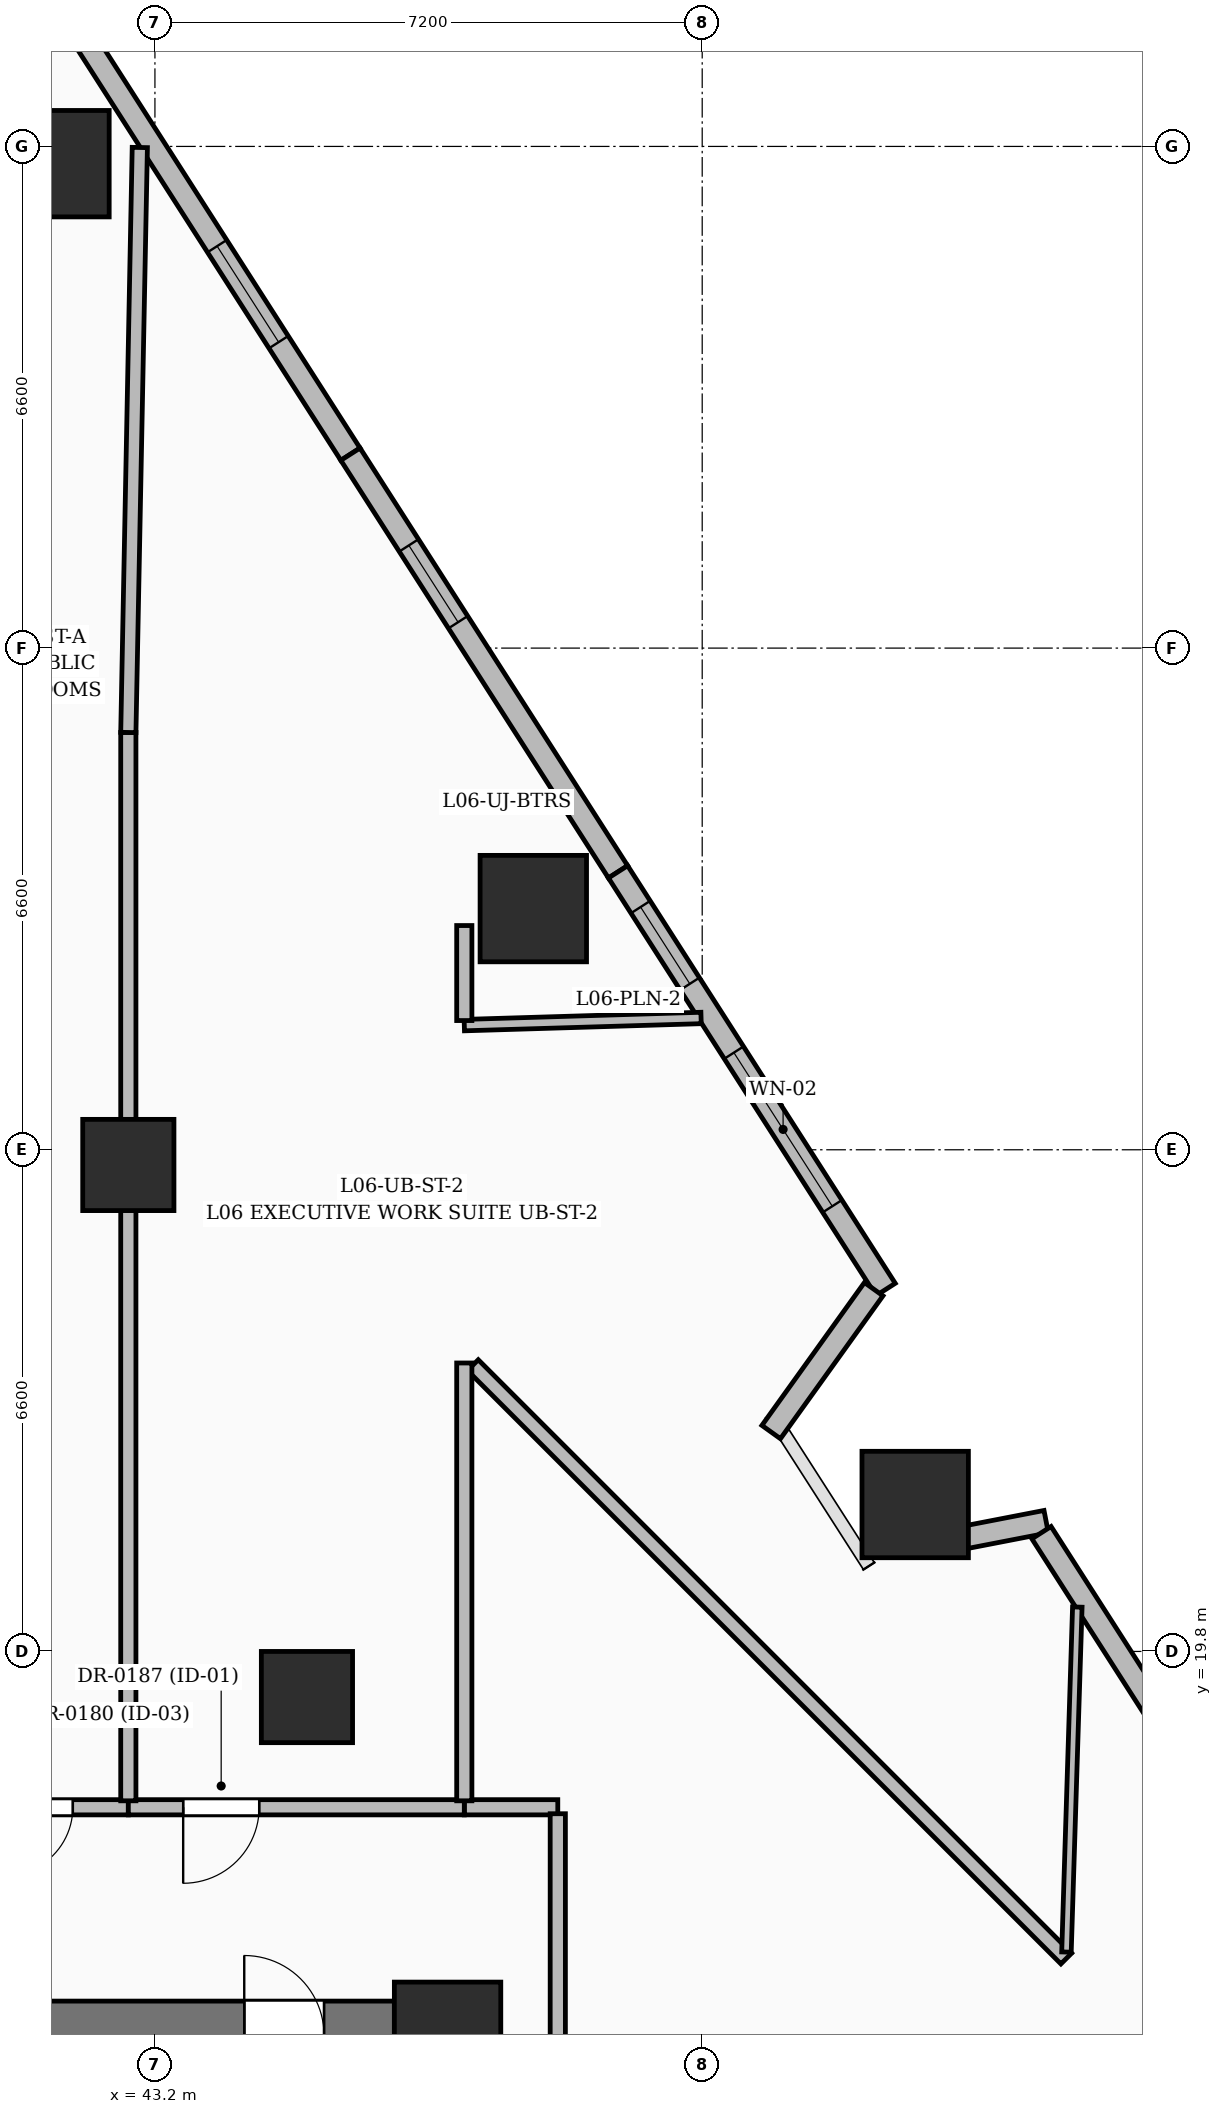
"""IFC4 building model, lengths in metres.
Left out: names, types, materials, properties, quantities, classifications, styles, units other than length and angle.
Written with IfcOpenShell. Run it as: python <this file> out.ifc"""

import sys

from ifc_helpers import new_model, si_unit, direction, frame, frame_2d, origin, origin_2d, place, context, subcontext, project, spatial, rectangle, extrude, element, fill, save


model = new_model("IFC4")
c1 = context("Model", 3, precision=1e-05, world=origin(), true_north=direction((0.0, 1.0)))
c2 = subcontext(c1, "Body", "Model", "MODEL_VIEW")
j1 = project(units=[si_unit("LENGTHUNIT", "METRE"), si_unit("PLANEANGLEUNIT", "RADIAN")], contexts=[c1])
p1 = place(None, origin())
s1 = spatial("IfcSite", under=j1, at=p1, CompositionType="ELEMENT")
p2 = place(p1, origin())
s2 = spatial("IfcBuilding", under=s1, at=p2, CompositionType="ELEMENT")
p3 = place(p2, frame((0.0, 0.0, 31.8)))
s3 = spatial("IfcBuildingStorey", under=s2, at=p3, CompositionType="ELEMENT", Elevation=31.8)
p4 = place(p3, frame((47.05, 14.75, 0.0), z_axis=(0.0, 0.0, 1.0), x_axis=(1.0, 0.0, 0.0)))
e1 = element("IfcColumn", 1, at=p4, inside=s3, PredefinedType="COLUMN", context=c2, shape_type="SweptSolid", body=[
    extrude(rectangle(XDim=1.4, YDim=1.4, at=origin_2d()), origin(), (0.0, 0.0, 1.0), 3.6),
])
for number, where, z_axis, x_axis in (
    (2, (45.2, 19.2, 0.0), (0.0, 0.0, 1.0), (1.0, 0.0, 0.0)),
    (3, (42.85, 26.2, 0.0), (0.0, 0.0, 1.0), (1.0, 0.0, 0.0)),
):
    element("IfcColumn", number, at=place(p3, frame(where, z_axis=z_axis, x_axis=x_axis)), inside=s3, PredefinedType="COLUMN", context=c2, shape_type="SweptSolid", body=[
        extrude(rectangle(XDim=1.2, YDim=1.2, at=origin_2d()), origin(), (0.0, 0.0, 1.0), 3.6),
    ])
p5 = place(p3, frame((35.85, 14.75, 0.0), z_axis=(0.0, 0.0, 1.0), x_axis=(1.0, 0.0, 0.0)))
e4 = element("IfcWall", 4, at=p5, inside=s3, PredefinedType="SHEAR", context=c2, shape_type="SweptSolid", body=[
    extrude(rectangle(XDim=10.5, YDim=0.9, at=frame_2d((5.25, 0.0))), origin(), (0.0, 0.0, 1.0), 3.6),
])
p6 = place(p5, frame((0.925, 0.0, 0.0)))
e5 = element("IfcOpeningElement", 5, at=p6, cuts=e4, PredefinedType="OPENING", context=c2, shape_type="SweptSolid", body=[
    extrude(rectangle(XDim=1.05, YDim=2.15, at=frame_2d((0.525, 1.075))), frame((0.0, 0.46, 0.0), z_axis=(0.0, -1.0, 0.0), x_axis=(1.0, 0.0, 0.0)), (0.0, 0.0, 1.0), 0.92),
])
p7 = place(p5, frame((8.525, 0.0, 0.0)))
e6 = element("IfcOpeningElement", 6, at=p7, cuts=e4, PredefinedType="OPENING", context=c2, shape_type="SweptSolid", body=[
    extrude(rectangle(XDim=1.05, YDim=2.15, at=frame_2d((0.525, 1.075))), frame((0.0, 0.46, 0.0), z_axis=(0.0, -1.0, 0.0), x_axis=(1.0, 0.0, 0.0)), (0.0, 0.0, 1.0), 0.92),
])
for number, where, z_axis, x_axis in (
    (7, (53.202, 21.733, 0.0), (0.0, 0.0, 1.0), (1.0, 0.0, 0.0)),
    (8, (48.178, 29.573, 0.0), (0.0, 0.0, 1.0), (1.0, 0.0, 0.0)),
    (9, (41.898, 39.373, 0.0), (0.0, 0.0, 1.0), (1.0, 0.0, 0.0)),
):
    element("IfcColumn", number, at=place(p3, frame(where, z_axis=z_axis, x_axis=x_axis)), inside=s3, PredefinedType="COLUMN", context=c2, shape_type="SweptSolid", body=[
        extrude(rectangle(XDim=1.4, YDim=1.4, at=origin_2d()), origin(), (0.0, 0.0, 1.0), 3.6),
    ])
p8 = place(p3, frame((42.251, 41.045, 0.0), z_axis=(0.0, 0.0, 1.0), x_axis=(0.539526045631, -0.841968910403, 0.0)))
e10 = element("IfcWall", 10, at=p8, inside=s3, PredefinedType="SOLIDWALL", context=c2, shape_type="SweptSolid", body=[
    extrude(rectangle(XDim=6.526, YDim=0.3, at=frame_2d((3.263, 0.0))), origin(), (0.0, 0.0, 1.0), 3.35),
])
p9 = place(p8, frame((3.275, 0.0, 0.6)))
e11 = element("IfcOpeningElement", 11, at=p9, cuts=e10, PredefinedType="OPENING", context=c2, shape_type="SweptSolid", body=[
    extrude(rectangle(XDim=1.5, YDim=2.1, at=frame_2d((0.75, 1.05))), frame((0.0, 0.16, 0.0), z_axis=(0.0, -1.0, 0.0), x_axis=(1.0, 0.0, 0.0)), (0.0, 0.0, 1.0), 0.32),
])
p10 = place(p3, frame((45.772, 35.551, 0.0), z_axis=(0.0, 0.0, 1.0), x_axis=(0.539526045631, -0.841968910403, 0.0)))
e12 = element("IfcWall", 12, at=p10, inside=s3, PredefinedType="SOLIDWALL", context=c2, shape_type="SweptSolid", body=[
    extrude(rectangle(XDim=6.526, YDim=0.3, at=frame_2d((3.263, 0.0))), origin(), (0.0, 0.0, 1.0), 3.35),
])
p11 = place(p10, frame((1.425, 0.0, 0.8)))
e13 = element("IfcOpeningElement", 13, at=p11, cuts=e12, PredefinedType="OPENING", context=c2, shape_type="SweptSolid", body=[
    extrude(rectangle(XDim=1.2, YDim=1.8, at=frame_2d((0.6, 0.9))), frame((0.0, 0.16, 0.0), z_axis=(0.0, -1.0, 0.0), x_axis=(1.0, 0.0, 0.0)), (0.0, 0.0, 1.0), 0.32),
])
p12 = place(p3, frame((49.293, 30.057, 0.0), z_axis=(0.0, 0.0, 1.0), x_axis=(0.539509050887, -0.84197980024, 0.0)))
e14 = element("IfcWall", 14, at=p12, inside=s3, PredefinedType="SOLIDWALL", context=c2, shape_type="SweptSolid", body=[
    extrude(rectangle(XDim=6.526, YDim=0.3, at=frame_2d((3.263, 0.0))), origin(), (0.0, 0.0, 1.0), 3.35),
])
p13 = place(p12, frame((2.825, 0.0, 0.6)))
e15 = element("IfcOpeningElement", 15, at=p13, cuts=e14, PredefinedType="OPENING", context=c2, shape_type="SweptSolid", body=[
    extrude(rectangle(XDim=2.4, YDim=2.1, at=frame_2d((1.2, 1.05))), frame((0.0, 0.16, 0.0), z_axis=(0.0, -1.0, 0.0), x_axis=(1.0, 0.0, 0.0)), (0.0, 0.0, 1.0), 0.32),
])
p14 = place(p12, frame((0.55, 0.0, 0.8)))
e16 = element("IfcOpeningElement", 16, at=p14, cuts=e14, PredefinedType="OPENING", context=c2, shape_type="SweptSolid", body=[
    extrude(rectangle(XDim=1.2, YDim=1.8, at=frame_2d((0.6, 0.9))), frame((0.0, 0.16, 0.0), z_axis=(0.0, -1.0, 0.0), x_axis=(1.0, 0.0, 0.0)), (0.0, 0.0, 1.0), 0.32),
])
p15 = place(p3, frame((52.656, 24.566, 0.0), z_axis=(0.0, 0.0, 1.0), x_axis=(-0.583053244013, -0.812433944789, 0.0)))
e17 = element("IfcWall", 17, at=p15, inside=s3, PredefinedType="SOLIDWALL", context=c2, shape_type="SweptSolid", body=[
    extrude(rectangle(XDim=2.314, YDim=0.3, at=frame_2d((1.157, 0.0))), origin(), (0.0, 0.0, 1.0), 2.375),
])
p16 = place(p3, frame((53.864, 21.302, 0.0), z_axis=(0.0, 0.0, 1.0), x_axis=(0.981752657473, 0.190162350493, 0.0)))
e18 = element("IfcWall", 18, at=p16, inside=s3, PredefinedType="SOLIDWALL", context=c2, shape_type="SweptSolid", body=[
    extrude(rectangle(XDim=1.081, YDim=0.3, at=frame_2d((0.541, 0.0))), origin(), (0.0, 0.0, 1.0), 2.375),
])
p17 = place(p3, frame((54.864, 21.363, 0.0), z_axis=(0.0, 0.0, 1.0), x_axis=(0.539525561028, -0.841969220932, 0.0)))
e19 = element("IfcWall", 19, at=p17, inside=s3, PredefinedType="SOLIDWALL", context=c2, shape_type="SweptSolid", body=[
    extrude(rectangle(XDim=5.872, YDim=0.3, at=frame_2d((2.936, 0.0))), origin(), (0.0, 0.0, 1.0), 3.35),
])
p18 = place(p17, frame((2.695, 0.0, 0.55)))
e20 = element("IfcOpeningElement", 20, at=p18, cuts=e19, PredefinedType="OPENING", context=c2, shape_type="SweptSolid", body=[
    extrude(rectangle(XDim=1.6, YDim=2.2, at=frame_2d((0.8, 1.1))), frame((0.0, 0.16, 0.0), z_axis=(0.0, -1.0, 0.0), x_axis=(1.0, 0.0, 0.0)), (0.0, 0.0, 1.0), 0.32),
])
p19 = place(p3, frame((48.5, 17.75, 0.0), z_axis=(0.0, 0.0, 1.0), x_axis=(-1.0, 0.0, 0.0)))
e21 = element("IfcWall", 21, at=p19, inside=s3, PredefinedType="PARTITIONING", context=c2, shape_type="SweptSolid", body=[
    extrude(rectangle(XDim=1.23, YDim=0.2, at=frame_2d((0.615, 0.0))), origin(), (0.0, 0.0, 1.0), 2.709),
])
p20 = place(p3, frame((42.85, 17.75, 0.0), z_axis=(0.0, 0.0, 1.0), x_axis=(-1.0, 0.0, 0.0)))
e22 = element("IfcWall", 22, at=p20, inside=s3, PredefinedType="PARTITIONING", context=c2, shape_type="SweptSolid", body=[
    extrude(rectangle(XDim=2.36, YDim=0.2, at=frame_2d((1.18, 0.0))), origin(), (0.0, 0.0, 1.0), 3.35),
])
p21 = place(p20, frame((0.73, 0.0, 0.0)))
e23 = element("IfcOpeningElement", 23, at=p21, cuts=e22, PredefinedType="OPENING", context=c2, shape_type="SweptSolid", body=[
    extrude(rectangle(XDim=0.9, YDim=2.1, at=frame_2d((0.45, 1.05))), frame((0.0, 0.11, 0.0), z_axis=(0.0, -1.0, 0.0), x_axis=(1.0, 0.0, 0.0)), (0.0, 0.0, 1.0), 0.22),
])
p22 = place(p3, frame((47.27, 17.75, 0.0), z_axis=(0.0, 0.0, 1.0), x_axis=(-1.0, 0.0, 0.0)))
e24 = element("IfcWall", 24, at=p22, inside=s3, PredefinedType="PARTITIONING", context=c2, shape_type="SweptSolid", body=[
    extrude(rectangle(XDim=4.42, YDim=0.2, at=frame_2d((2.21, 0.0))), origin(), (0.0, 0.0, 1.0), 2.309),
])
p23 = place(p22, frame((2.698, 0.0, 0.0)))
e25 = element("IfcOpeningElement", 25, at=p23, cuts=e24, PredefinedType="OPENING", context=c2, shape_type="SweptSolid", body=[
    extrude(rectangle(XDim=1.0, YDim=2.2, at=frame_2d((0.5, 1.1))), frame((0.0, 0.11, 0.0), z_axis=(0.0, -1.0, 0.0), x_axis=(1.0, 0.0, 0.0)), (0.0, 0.0, 1.0), 0.22),
])
p24 = place(p3, frame((55.19, 15.76, 0.0), z_axis=(0.0, 0.0, 1.0), x_axis=(-0.707106781187, 0.707106781187, 0.0)))
e26 = element("IfcWall", 26, at=p24, inside=s3, PredefinedType="PARTITIONING", context=c2, shape_type="SweptSolid", body=[
    extrude(rectangle(XDim=11.041, YDim=0.2, at=frame_2d((5.52, 0.0))), origin(), (0.0, 0.0, 1.0), 2.228),
])
p25 = place(p3, frame((47.27, 23.595, 0.0), z_axis=(0.0, 0.0, 1.0), x_axis=(0.0, -1.0, 0.0)))
e27 = element("IfcWall", 27, at=p25, inside=s3, PredefinedType="PARTITIONING", context=c2, shape_type="SweptSolid", body=[
    extrude(rectangle(XDim=5.76, YDim=0.2, at=frame_2d((2.88, 0.0))), origin(), (0.0, 0.0, 1.0), 2.709),
])
p26 = place(p3, frame((55.192, 15.845, 0.0), z_axis=(0.0, 0.0, 1.0), x_axis=(0.031449581736, 0.99950533956, 0.0)))
e28 = element("IfcWall", 28, at=p26, inside=s3, PredefinedType="PARTITIONING", context=c2, shape_type="SweptSolid", body=[
    extrude(rectangle(XDim=4.541, YDim=0.125, at=frame_2d((2.271, 0.0))), origin(), (0.0, 0.0, 1.0), 2.37),
])
p27 = place(p3, frame((50.385, 28.134, 0.0), z_axis=(0.0, 0.0, 1.0), x_axis=(-0.999545052024, -0.030161050633, 0.0)))
e29 = element("IfcWall", 29, at=p27, inside=s3, PredefinedType="PARTITIONING", context=c2, shape_type="SweptSolid", body=[
    extrude(rectangle(XDim=3.116, YDim=0.15, at=frame_2d((1.558, 0.0))), origin(), (0.0, 0.0, 1.0), 2.228),
])
p28 = place(p3, frame((47.27, 29.35, 0.0), z_axis=(0.0, 0.0, 1.0), x_axis=(0.0, -1.0, 0.0)))
e30 = element("IfcWall", 30, at=p28, inside=s3, PredefinedType="PARTITIONING", context=c2, shape_type="SweptSolid", body=[
    extrude(rectangle(XDim=1.25, YDim=0.2, at=frame_2d((0.625, 0.0))), origin(), (0.0, 0.0, 1.0), 3.35),
])
p29 = place(p3, frame((42.85, 17.835, 0.0), z_axis=(0.0, 0.0, 1.0), x_axis=(0.0, 1.0, 0.0)))
e31 = element("IfcWall", 31, at=p29, inside=s3, PredefinedType="PARTITIONING", context=c2, shape_type="SweptSolid", body=[
    extrude(rectangle(XDim=14.055, YDim=0.2, at=frame_2d((7.027, 0.0))), origin(), (0.0, 0.0, 1.0), 2.228),
])
p30 = place(p3, frame((42.85, 31.89, 0.0), z_axis=(0.0, 0.0, 1.0), x_axis=(0.019600966642, 0.999807882599, 0.0)))
e32 = element("IfcWall", 32, at=p30, inside=s3, PredefinedType="PARTITIONING", context=c2, shape_type="SweptSolid", body=[
    extrude(rectangle(XDim=7.698, YDim=0.2, at=frame_2d((3.849, 0.0))), origin(), (0.0, 0.0, 1.0), 2.37),
])
p31 = place(p3, frame((48.5, 14.285, 0.0), z_axis=(0.0, 0.0, 1.0), x_axis=(0.0, 1.0, 0.0)))
e33 = element("IfcWall", 33, at=p31, inside=s3, PredefinedType="PARTITIONING", context=c2, shape_type="SweptSolid", body=[
    extrude(rectangle(XDim=3.38, YDim=0.2, at=frame_2d((1.69, 0.0))), origin(), (0.0, 0.0, 1.0), 2.228),
])
p32 = place(p9, origin())
e34 = element("IfcWindow", 34, at=p32, inside=s3, PartitioningType="SINGLE_PANEL", PredefinedType="WINDOW", context=c2, shape_type="SweptSolid", body=[
    extrude(rectangle(XDim=1.5, YDim=2.1, at=frame_2d((0.75, 1.05))), frame((0.0, 0.03, 0.0), z_axis=(0.0, -1.0, 0.0), x_axis=(1.0, 0.0, 0.0)), (0.0, 0.0, 1.0), 0.06),
])
fill(e11, e34)
p33 = place(p11, origin())
e35 = element("IfcWindow", 35, at=p33, inside=s3, PartitioningType="SINGLE_PANEL", PredefinedType="WINDOW", context=c2, shape_type="SweptSolid", body=[
    extrude(rectangle(XDim=1.2, YDim=1.8, at=frame_2d((0.6, 0.9))), frame((0.0, 0.03, 0.0), z_axis=(0.0, -1.0, 0.0), x_axis=(1.0, 0.0, 0.0)), (0.0, 0.0, 1.0), 0.06),
])
fill(e13, e35)
p34 = place(p13, origin())
e36 = element("IfcWindow", 36, at=p34, inside=s3, PartitioningType="SINGLE_PANEL", PredefinedType="WINDOW", context=c2, shape_type="SweptSolid", body=[
    extrude(rectangle(XDim=2.4, YDim=2.1, at=frame_2d((1.2, 1.05))), frame((0.0, 0.03, 0.0), z_axis=(0.0, -1.0, 0.0), x_axis=(1.0, 0.0, 0.0)), (0.0, 0.0, 1.0), 0.06),
])
fill(e15, e36)
p35 = place(p14, origin())
e37 = element("IfcWindow", 37, at=p35, inside=s3, PartitioningType="SINGLE_PANEL", PredefinedType="WINDOW", context=c2, shape_type="SweptSolid", body=[
    extrude(rectangle(XDim=1.2, YDim=1.8, at=frame_2d((0.6, 0.9))), frame((0.0, 0.03, 0.0), z_axis=(0.0, -1.0, 0.0), x_axis=(1.0, 0.0, 0.0)), (0.0, 0.0, 1.0), 0.06),
])
fill(e16, e37)
p36 = place(p7, origin())
e38 = element("IfcDoor", 38, at=p36, inside=s3, OperationType="SINGLE_SWING_LEFT", PredefinedType="DOOR", context=c2, shape_type="SweptSolid", body=[
    extrude(rectangle(XDim=1.05, YDim=2.15, at=frame_2d((0.525, 1.075))), frame((0.0, 0.025, 0.0), z_axis=(0.0, -1.0, 0.0), x_axis=(1.0, 0.0, 0.0)), (0.0, 0.0, 1.0), 0.05),
])
fill(e6, e38)
p37 = place(p21, origin())
e39 = element("IfcDoor", 39, at=p37, inside=s3, OperationType="SINGLE_SWING_RIGHT", PredefinedType="DOOR", context=c2, shape_type="SweptSolid", body=[
    extrude(rectangle(XDim=0.9, YDim=2.1, at=frame_2d((0.45, 1.05))), frame((0.0, 0.025, 0.0), z_axis=(0.0, -1.0, 0.0), x_axis=(1.0, 0.0, 0.0)), (0.0, 0.0, 1.0), 0.05),
])
fill(e23, e39)
p38 = place(p23, origin())
e40 = element("IfcDoor", 40, at=p38, inside=s3, OperationType="SINGLE_SWING_RIGHT", PredefinedType="DOOR", context=c2, shape_type="SweptSolid", body=[
    extrude(rectangle(XDim=1.0, YDim=2.2, at=frame_2d((0.5, 1.1))), frame((0.0, 0.025, 0.0), z_axis=(0.0, -1.0, 0.0), x_axis=(1.0, 0.0, 0.0)), (0.0, 0.0, 1.0), 0.05),
])
fill(e25, e40)
save(model, sys.argv[1])
